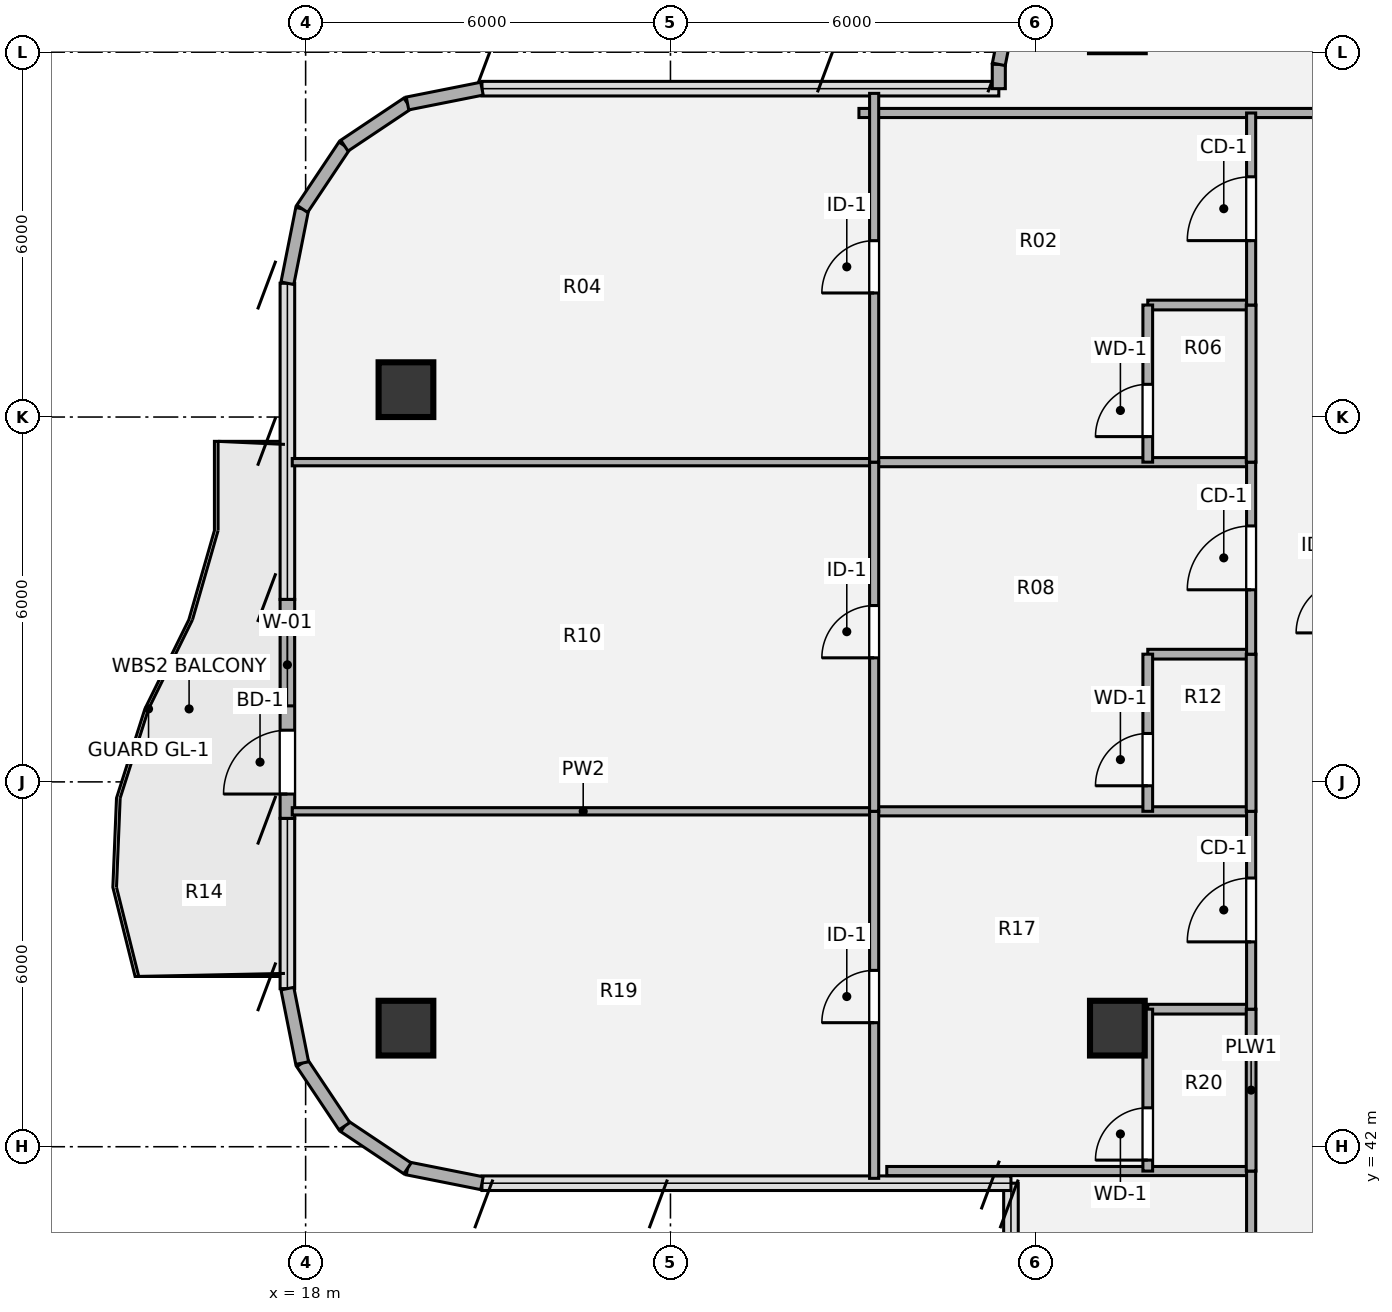
"""IFC4 building model, lengths in metres.
Left out: names, types, materials, properties, quantities, classifications, styles, units other than length and angle.
Written with IfcOpenShell. Run it as: python <this file> out.ifc"""

import sys

from ifc_helpers import new_model, si_unit, direction, frame, frame_2d, origin, origin_2d, place, context, subcontext, project, spatial, rectangle, hollow_circle, extrude, source, transform, mapped, element, fill, save


model = new_model("IFC4")
c1 = context("Model", 3, precision=1e-05, world=origin(), true_north=direction((0.0, 1.0)))
c2 = subcontext(c1, "Body", "Model", "MODEL_VIEW")
j1 = project(units=[si_unit("LENGTHUNIT", "METRE"), si_unit("PLANEANGLEUNIT", "RADIAN")], contexts=[c1])
p1 = place(None, origin())
s1 = spatial("IfcSite", under=j1, at=p1, CompositionType="ELEMENT")
p2 = place(p1, origin())
s2 = spatial("IfcBuilding", under=s1, at=p2, CompositionType="ELEMENT")
p3 = place(p2, frame((0.0, 0.0, 238.14)))
s3 = spatial("IfcBuildingStorey", under=s2, at=p3, CompositionType="ELEMENT", Elevation=238.14)
m1 = source(origin(), c2, "Body", "SweptSolid", [
    extrude(hollow_circle(Radius=0.45, WallThickness=0.032, at=origin_2d()), origin(), (0.0, 0.0, 1.0), 3.78),
])
for number, where, z_axis, x_axis in (
    (1, (19.65, 43.95, 0.0), (0.0, 0.0, 1.0), (1.0, 0.0, 0.0)),
    (2, (19.65, 54.45, 0.0), (0.0, 0.0, 1.0), (1.0, 0.0, 0.0)),
    (3, (31.35, 43.95, 0.0), (0.0, 0.0, 1.0), (1.0, 0.0, 0.0)),
):
    element("IfcColumn", number, at=place(p3, frame(where, z_axis=z_axis, x_axis=x_axis)), inside=s3, PredefinedType="COLUMN", context=c2, shape_type="MappedRepresentation", body=[
        mapped(m1, transform((0.0, 0.0, 0.0), x_axis=(1.0, 0.0, 0.0), y_axis=(0.0, 1.0, 0.0), z_axis=(0.0, 0.0, 1.0), scale=1.0)),
    ])
for number, where, z_axis, x_axis in (
    (4, (20.9, 41.4, 0.0), (0.0, 0.0, 1.0), (-0.981, 0.195, 0.0)),
    (5, (19.675, 41.644, 0.0), (0.0, 0.0, 1.0), (-0.831, 0.556, 0.0)),
    (6, (18.637, 42.337, 0.0), (0.0, 0.0, 1.0), (-0.556, 0.831, 0.0)),
    (7, (17.944, 43.375, 0.0), (0.0, 0.0, 1.0), (-0.195, 0.981, 0.0)),
):
    element("IfcWall", number, at=place(p3, frame(where, z_axis=z_axis, x_axis=x_axis)), inside=s3, PredefinedType="SOLIDWALL", context=c2, shape_type="SweptSolid", body=[
        extrude(rectangle(XDim=1.249, YDim=0.215, at=frame_2d((0.624, 0.0))), origin(), (0.0, 0.0, 1.0), 3.53),
    ])
p4 = place(p3, frame((17.7, 47.4, 0.0), z_axis=(0.0, 0.0, 1.0), x_axis=(0.0, 1.0, 0.0)))
e8 = element("IfcWall", 8, at=p4, inside=s3, PredefinedType="SOLIDWALL", context=c2, shape_type="SweptSolid", body=[
    extrude(rectangle(XDim=3.6, YDim=0.24, at=frame_2d((1.8, 0.0))), origin(), (0.0, 0.0, 1.0), 3.53),
])
p5 = place(p4, frame((0.4, 0.0, 0.0)))
e9 = element("IfcOpeningElement", 9, at=p5, cuts=e8, PredefinedType="OPENING", context=c2, shape_type="SweptSolid", body=[
    extrude(rectangle(XDim=1.05, YDim=2.15, at=origin_2d()), frame((0.525, 0.13, 1.075), z_axis=(0.0, -1.0, 0.0), x_axis=(1.0, 0.0, 0.0)), (0.0, 0.0, 1.0), 0.26),
])
p6 = place(p4, frame((1.85, 0.0, 0.85)))
e10 = element("IfcOpeningElement", 10, at=p6, cuts=e8, PredefinedType="OPENING", context=c2, shape_type="SweptSolid", body=[
    extrude(rectangle(XDim=1.35, YDim=1.35, at=origin_2d()), frame((0.675, 0.13, 0.675), z_axis=(0.0, -1.0, 0.0), x_axis=(1.0, 0.0, 0.0)), (0.0, 0.0, 1.0), 0.26),
])
for number, where, z_axis, x_axis in (
    (11, (17.7, 56.2, 0.0), (0.0, 0.0, 1.0), (0.195, 0.981, 0.0)),
    (12, (17.944, 57.425, 0.0), (0.0, 0.0, 1.0), (0.556, 0.831, 0.0)),
    (13, (18.637, 58.463, 0.0), (0.0, 0.0, 1.0), (0.831, 0.556, 0.0)),
    (14, (19.675, 59.156, 0.0), (0.0, 0.0, 1.0), (0.981, 0.195, 0.0)),
):
    element("IfcWall", number, at=place(p3, frame(where, z_axis=z_axis, x_axis=x_axis)), inside=s3, PredefinedType="SOLIDWALL", context=c2, shape_type="SweptSolid", body=[
        extrude(rectangle(XDim=1.249, YDim=0.215, at=frame_2d((0.624, 0.0))), origin(), (0.0, 0.0, 1.0), 3.53),
    ])
p7 = place(p3, frame((29.4, 59.4, 0.0), z_axis=(0.0, 0.0, 1.0), x_axis=(0.0, 1.0, 0.0)))
e15 = element("IfcWall", 15, at=p7, inside=s3, PredefinedType="SOLIDWALL", context=c2, shape_type="SweptSolid", body=[
    extrude(rectangle(XDim=0.4, YDim=0.215, at=frame_2d((0.2, 0.0))), origin(), (0.0, 0.0, 1.0), 3.53),
])
p8 = place(p3, frame((29.4, 59.8, 0.0), z_axis=(0.0, 0.0, 1.0), x_axis=(0.195190360752, 0.980765376158, 0.0)))
e16 = element("IfcWall", 16, at=p8, inside=s3, PredefinedType="SOLIDWALL", context=c2, shape_type="SweptSolid", body=[
    extrude(rectangle(XDim=1.014, YDim=0.215, at=frame_2d((0.507, 0.0))), origin(), (0.0, 0.0, 1.0), 3.53),
])
p9 = place(p3, frame((27.558, 41.6, 0.0), z_axis=(0.0, 0.0, 1.0), x_axis=(1.0, 0.0, 0.0)))
e17 = element("IfcWall", 17, at=p9, inside=s3, PredefinedType="PARTITIONING", context=c2, shape_type="SweptSolid", body=[
    extrude(rectangle(XDim=5.992, YDim=0.15, at=frame_2d((2.996, 0.0))), origin(), (0.0, 0.0, 1.0), 3.5),
])
p10 = place(p3, frame((31.85, 44.262, 0.0), z_axis=(0.0, 0.0, 1.0), x_axis=(1.0, 0.0, 0.0)))
e18 = element("IfcWall", 18, at=p10, inside=s3, PredefinedType="PLUMBINGWALL", context=c2, shape_type="SweptSolid", body=[
    extrude(rectangle(XDim=1.7, YDim=0.16, at=frame_2d((0.85, 0.0))), origin(), (0.0, 0.0, 1.0), 2.903),
])
p11 = place(p3, frame((17.78, 47.516, 0.0), z_axis=(0.0, 0.0, 1.0), x_axis=(1.0, 0.0, 0.0)))
e19 = element("IfcWall", 19, at=p11, inside=s3, PredefinedType="PARTITIONING", context=c2, shape_type="SweptSolid", body=[
    extrude(rectangle(XDim=9.57, YDim=0.12, at=frame_2d((4.785, 0.0))), origin(), (0.0, 0.0, 1.0), 2.982),
])
p12 = place(p3, frame((27.35, 47.516, 0.0), z_axis=(0.0, 0.0, 1.0), x_axis=(1.0, 0.0, 0.0)))
e20 = element("IfcWall", 20, at=p12, inside=s3, PredefinedType="PARTITIONING", context=c2, shape_type="SweptSolid", body=[
    extrude(rectangle(XDim=6.2, YDim=0.15, at=frame_2d((3.1, 0.0))), origin(), (0.0, 0.0, 1.0), 2.982),
])
p13 = place(p3, frame((31.85, 50.1, 0.0), z_axis=(0.0, 0.0, 1.0), x_axis=(1.0, 0.0, 0.0)))
e21 = element("IfcWall", 21, at=p13, inside=s3, PredefinedType="PLUMBINGWALL", context=c2, shape_type="SweptSolid", body=[
    extrude(rectangle(XDim=1.7, YDim=0.16, at=frame_2d((0.85, 0.0))), origin(), (0.0, 0.0, 1.0), 3.259),
])
p14 = place(p3, frame((17.78, 53.258, 0.0), z_axis=(0.0, 0.0, 1.0), x_axis=(1.0, 0.0, 0.0)))
e22 = element("IfcWall", 22, at=p14, inside=s3, PredefinedType="PARTITIONING", context=c2, shape_type="SweptSolid", body=[
    extrude(rectangle(XDim=9.57, YDim=0.12, at=frame_2d((4.785, 0.0))), origin(), (0.0, 0.0, 1.0), 3.055),
])
p15 = place(p3, frame((27.35, 53.258, 0.0), z_axis=(0.0, 0.0, 1.0), x_axis=(1.0, 0.0, 0.0)))
e23 = element("IfcWall", 23, at=p15, inside=s3, PredefinedType="PARTITIONING", context=c2, shape_type="SweptSolid", body=[
    extrude(rectangle(XDim=6.2, YDim=0.15, at=frame_2d((3.1, 0.0))), origin(), (0.0, 0.0, 1.0), 3.055),
])
p16 = place(p3, frame((31.85, 55.842, 0.0), z_axis=(0.0, 0.0, 1.0), x_axis=(1.0, 0.0, 0.0)))
e24 = element("IfcWall", 24, at=p16, inside=s3, PredefinedType="PLUMBINGWALL", context=c2, shape_type="SweptSolid", body=[
    extrude(rectangle(XDim=1.7, YDim=0.16, at=frame_2d((0.85, 0.0))), origin(), (0.0, 0.0, 1.0), 3.259),
])
p17 = place(p3, frame((27.1, 59.0, 0.0), z_axis=(0.0, 0.0, 1.0), x_axis=(1.0, 0.0, 0.0)))
e25 = element("IfcWall", 25, at=p17, inside=s3, PredefinedType="PARTITIONING", context=c2, shape_type="SweptSolid", body=[
    extrude(rectangle(XDim=17.8, YDim=0.15, at=frame_2d((8.9, 0.0))), origin(), (0.0, 0.0, 1.0), 3.308),
])
p18 = place(p17, frame((8.375, 0.0, 0.0)))
e26 = element("IfcOpeningElement", 26, at=p18, cuts=e25, PredefinedType="OPENING", context=c2, shape_type="SweptSolid", body=[
    extrude(rectangle(XDim=1.05, YDim=2.1, at=origin_2d()), frame((0.525, 0.085, 1.05), z_axis=(0.0, -1.0, 0.0), x_axis=(1.0, 0.0, 0.0)), (0.0, 0.0, 1.0), 0.17),
])
p19 = place(p3, frame((27.35, 41.48, 0.0), z_axis=(0.0, 0.0, 1.0), x_axis=(0.0, 1.0, 0.0)))
e27 = element("IfcWall", 27, at=p19, inside=s3, PredefinedType="PARTITIONING", context=c2, shape_type="SweptSolid", body=[
    extrude(rectangle(XDim=6.036, YDim=0.15, at=frame_2d((3.018, 0.0))), origin(), (0.0, 0.0, 1.0), 3.5),
])
p20 = place(p19, frame((2.56, 0.0, 0.0)))
e28 = element("IfcOpeningElement", 28, at=p20, cuts=e27, PredefinedType="OPENING", context=c2, shape_type="SweptSolid", body=[
    extrude(rectangle(XDim=0.86, YDim=2.1, at=origin_2d()), frame((0.43, 0.085, 1.05), z_axis=(0.0, -1.0, 0.0), x_axis=(1.0, 0.0, 0.0)), (0.0, 0.0, 1.0), 0.17),
])
p21 = place(p3, frame((27.35, 47.516, 0.0), z_axis=(0.0, 0.0, 1.0), x_axis=(0.0, 1.0, 0.0)))
e29 = element("IfcWall", 29, at=p21, inside=s3, PredefinedType="PARTITIONING", context=c2, shape_type="SweptSolid", body=[
    extrude(rectangle(XDim=5.742, YDim=0.15, at=frame_2d((2.871, 0.0))), origin(), (0.0, 0.0, 1.0), 3.5),
])
p22 = place(p21, frame((2.524, 0.0, 0.0)))
e30 = element("IfcOpeningElement", 30, at=p22, cuts=e29, PredefinedType="OPENING", context=c2, shape_type="SweptSolid", body=[
    extrude(rectangle(XDim=0.86, YDim=2.1, at=origin_2d()), frame((0.43, 0.085, 1.05), z_axis=(0.0, -1.0, 0.0), x_axis=(1.0, 0.0, 0.0)), (0.0, 0.0, 1.0), 0.17),
])
p23 = place(p3, frame((27.35, 53.258, 0.0), z_axis=(0.0, 0.0, 1.0), x_axis=(0.0, 1.0, 0.0)))
e31 = element("IfcWall", 31, at=p23, inside=s3, PredefinedType="PARTITIONING", context=c2, shape_type="SweptSolid", body=[
    extrude(rectangle(XDim=6.064, YDim=0.15, at=frame_2d((3.032, 0.0))), origin(), (0.0, 0.0, 1.0), 3.5),
])
p24 = place(p23, frame((2.782, 0.0, 0.0)))
e32 = element("IfcOpeningElement", 32, at=p24, cuts=e31, PredefinedType="OPENING", context=c2, shape_type="SweptSolid", body=[
    extrude(rectangle(XDim=0.86, YDim=2.1, at=origin_2d()), frame((0.43, 0.085, 1.05), z_axis=(0.0, -1.0, 0.0), x_axis=(1.0, 0.0, 0.0)), (0.0, 0.0, 1.0), 0.17),
])
p25 = place(p3, frame((31.85, 41.6, 0.0), z_axis=(0.0, 0.0, 1.0), x_axis=(0.0, 1.0, 0.0)))
e33 = element("IfcWall", 33, at=p25, inside=s3, PredefinedType="PLUMBINGWALL", context=c2, shape_type="SweptSolid", body=[
    extrude(rectangle(XDim=2.662, YDim=0.16, at=frame_2d((1.331, 0.0))), origin(), (0.0, 0.0, 1.0), 3.5),
])
p26 = place(p25, frame((0.18, 0.0, 0.0)))
e34 = element("IfcOpeningElement", 34, at=p26, cuts=e33, PredefinedType="OPENING", context=c2, shape_type="SweptSolid", body=[
    extrude(rectangle(XDim=0.86, YDim=2.1, at=origin_2d()), frame((0.43, 0.09, 1.05), z_axis=(0.0, -1.0, 0.0), x_axis=(1.0, 0.0, 0.0)), (0.0, 0.0, 1.0), 0.18),
])
p27 = place(p3, frame((31.85, 47.516, 0.0), z_axis=(0.0, 0.0, 1.0), x_axis=(0.0, 1.0, 0.0)))
e35 = element("IfcWall", 35, at=p27, inside=s3, PredefinedType="PLUMBINGWALL", context=c2, shape_type="SweptSolid", body=[
    extrude(rectangle(XDim=2.584, YDim=0.16, at=frame_2d((1.292, 0.0))), origin(), (0.0, 0.0, 1.0), 3.5),
])
p28 = place(p27, frame((0.42, 0.0, 0.0)))
e36 = element("IfcOpeningElement", 36, at=p28, cuts=e35, PredefinedType="OPENING", context=c2, shape_type="SweptSolid", body=[
    extrude(rectangle(XDim=0.86, YDim=2.1, at=origin_2d()), frame((0.43, 0.09, 1.05), z_axis=(0.0, -1.0, 0.0), x_axis=(1.0, 0.0, 0.0)), (0.0, 0.0, 1.0), 0.18),
])
p29 = place(p3, frame((31.85, 53.258, 0.0), z_axis=(0.0, 0.0, 1.0), x_axis=(0.0, 1.0, 0.0)))
e37 = element("IfcWall", 37, at=p29, inside=s3, PredefinedType="PLUMBINGWALL", context=c2, shape_type="SweptSolid", body=[
    extrude(rectangle(XDim=2.584, YDim=0.16, at=frame_2d((1.292, 0.0))), origin(), (0.0, 0.0, 1.0), 3.5),
])
p30 = place(p29, frame((0.42, 0.0, 0.0)))
e38 = element("IfcOpeningElement", 38, at=p30, cuts=e37, PredefinedType="OPENING", context=c2, shape_type="SweptSolid", body=[
    extrude(rectangle(XDim=0.86, YDim=2.1, at=origin_2d()), frame((0.43, 0.09, 1.05), z_axis=(0.0, -1.0, 0.0), x_axis=(1.0, 0.0, 0.0)), (0.0, 0.0, 1.0), 0.18),
])
p31 = place(p3, frame((33.55, 22.8, 0.0), z_axis=(0.0, 0.0, 1.0), x_axis=(0.0, 1.0, 0.0)))
e39 = element("IfcWall", 39, at=p31, inside=s3, PredefinedType="PARTITIONING", context=c2, shape_type="SweptSolid", body=[
    extrude(rectangle(XDim=18.8, YDim=0.15, at=frame_2d((9.4, 0.0))), origin(), (0.0, 0.0, 1.0), 3.5),
])
p32 = place(p31, frame((8.84, 0.0, 0.0)))
e40 = element("IfcOpeningElement", 40, at=p32, cuts=e39, PredefinedType="OPENING", context=c2, shape_type="SweptSolid", body=[
    extrude(rectangle(XDim=0.86, YDim=2.1, at=origin_2d()), frame((0.43, 0.085, 1.05), z_axis=(0.0, -1.0, 0.0), x_axis=(1.0, 0.0, 0.0)), (0.0, 0.0, 1.0), 0.17),
])
p33 = place(p3, frame((33.55, 41.6, 0.0), z_axis=(0.0, 0.0, 1.0), x_axis=(0.0, 1.0, 0.0)))
e41 = element("IfcWall", 41, at=p33, inside=s3, PredefinedType="PLUMBINGWALL", context=c2, shape_type="SweptSolid", body=[
    extrude(rectangle(XDim=2.662, YDim=0.16, at=frame_2d((1.331, 0.0))), origin(), (0.0, 0.0, 1.0), 3.5),
])
p34 = place(p3, frame((33.55, 44.262, 0.0), z_axis=(0.0, 0.0, 1.0), x_axis=(0.0, 1.0, 0.0)))
e42 = element("IfcWall", 42, at=p34, inside=s3, PredefinedType="PARTITIONING", context=c2, shape_type="SweptSolid", body=[
    extrude(rectangle(XDim=3.254, YDim=0.15, at=frame_2d((1.627, 0.0))), origin(), (0.0, 0.0, 1.0), 3.5),
])
p35 = place(p34, frame((1.107, 0.0, 0.0)))
e43 = element("IfcOpeningElement", 43, at=p35, cuts=e42, PredefinedType="OPENING", context=c2, shape_type="SweptSolid", body=[
    extrude(rectangle(XDim=1.05, YDim=2.1, at=origin_2d()), frame((0.525, 0.085, 1.05), z_axis=(0.0, -1.0, 0.0), x_axis=(1.0, 0.0, 0.0)), (0.0, 0.0, 1.0), 0.17),
])
p36 = place(p3, frame((33.55, 47.516, 0.0), z_axis=(0.0, 0.0, 1.0), x_axis=(0.0, 1.0, 0.0)))
e44 = element("IfcWall", 44, at=p36, inside=s3, PredefinedType="PLUMBINGWALL", context=c2, shape_type="SweptSolid", body=[
    extrude(rectangle(XDim=2.584, YDim=0.16, at=frame_2d((1.292, 0.0))), origin(), (0.0, 0.0, 1.0), 3.5),
])
p37 = place(p3, frame((33.55, 50.1, 0.0), z_axis=(0.0, 0.0, 1.0), x_axis=(0.0, 1.0, 0.0)))
e45 = element("IfcWall", 45, at=p37, inside=s3, PredefinedType="PARTITIONING", context=c2, shape_type="SweptSolid", body=[
    extrude(rectangle(XDim=3.158, YDim=0.15, at=frame_2d((1.579, 0.0))), origin(), (0.0, 0.0, 1.0), 3.5),
])
p38 = place(p37, frame((1.059, 0.0, 0.0)))
e46 = element("IfcOpeningElement", 46, at=p38, cuts=e45, PredefinedType="OPENING", context=c2, shape_type="SweptSolid", body=[
    extrude(rectangle(XDim=1.05, YDim=2.1, at=origin_2d()), frame((0.525, 0.085, 1.05), z_axis=(0.0, -1.0, 0.0), x_axis=(1.0, 0.0, 0.0)), (0.0, 0.0, 1.0), 0.17),
])
p39 = place(p3, frame((33.55, 53.258, 0.0), z_axis=(0.0, 0.0, 1.0), x_axis=(0.0, 1.0, 0.0)))
e47 = element("IfcWall", 47, at=p39, inside=s3, PredefinedType="PLUMBINGWALL", context=c2, shape_type="SweptSolid", body=[
    extrude(rectangle(XDim=2.584, YDim=0.16, at=frame_2d((1.292, 0.0))), origin(), (0.0, 0.0, 1.0), 3.5),
])
p40 = place(p3, frame((33.55, 55.842, 0.0), z_axis=(0.0, 0.0, 1.0), x_axis=(0.0, 1.0, 0.0)))
e48 = element("IfcWall", 48, at=p40, inside=s3, PredefinedType="PARTITIONING", context=c2, shape_type="SweptSolid", body=[
    extrude(rectangle(XDim=3.158, YDim=0.15, at=frame_2d((1.579, 0.0))), origin(), (0.0, 0.0, 1.0), 3.5),
])
p41 = place(p40, frame((1.059, 0.0, 0.0)))
e49 = element("IfcOpeningElement", 49, at=p41, cuts=e48, PredefinedType="OPENING", context=c2, shape_type="SweptSolid", body=[
    extrude(rectangle(XDim=1.05, YDim=2.1, at=origin_2d()), frame((0.525, 0.085, 1.05), z_axis=(0.0, -1.0, 0.0), x_axis=(1.0, 0.0, 0.0)), (0.0, 0.0, 1.0), 0.17),
])
m2 = source(origin(), c2, "Body", "SweptSolid", [
    extrude(rectangle(XDim=1.05, YDim=2.15, at=origin_2d()), frame((0.525, 0.025, 1.075), z_axis=(0.0, -1.0, 0.0), x_axis=(1.0, 0.0, 0.0)), (0.0, 0.0, 1.0), 0.05),
])
p42 = place(p5, origin())
e50 = element("IfcDoor", 50, at=p42, inside=s3, OperationType="SINGLE_SWING_LEFT", PredefinedType="DOOR", context=c2, shape_type="MappedRepresentation", body=[
    mapped(m2, transform((0.0, 0.0, 0.0), x_axis=(1.0, 0.0, 0.0), y_axis=(0.0, 1.0, 0.0), z_axis=(0.0, 0.0, 1.0), scale=1.0)),
])
fill(e9, e50)
m3 = source(origin(), c2, "Body", "SweptSolid", [
    extrude(rectangle(XDim=1.35, YDim=1.35, at=origin_2d()), frame((0.675, 0.03, 0.675), z_axis=(0.0, -1.0, 0.0), x_axis=(1.0, 0.0, 0.0)), (0.0, 0.0, 1.0), 0.06),
])
p43 = place(p6, origin())
e51 = element("IfcWindow", 51, at=p43, inside=s3, PartitioningType="SINGLE_PANEL", PredefinedType="WINDOW", context=c2, shape_type="MappedRepresentation", body=[
    mapped(m3, transform((0.0, 0.0, 0.0), x_axis=(1.0, 0.0, 0.0), y_axis=(0.0, 1.0, 0.0), z_axis=(0.0, 0.0, 1.0), scale=1.0)),
])
fill(e10, e51)
m4 = source(origin(), c2, "Body", "SweptSolid", [
    extrude(rectangle(XDim=0.86, YDim=2.1, at=origin_2d()), frame((0.43, 0.025, 1.05), z_axis=(0.0, -1.0, 0.0), x_axis=(1.0, 0.0, 0.0)), (0.0, 0.0, 1.0), 0.05),
])
p44 = place(p20, origin())
e52 = element("IfcDoor", 52, at=p44, inside=s3, OperationType="SINGLE_SWING_LEFT", PredefinedType="DOOR", context=c2, shape_type="MappedRepresentation", body=[
    mapped(m4, transform((0.0, 0.0, 0.0), x_axis=(1.0, 0.0, 0.0), y_axis=(0.0, 1.0, 0.0), z_axis=(0.0, 0.0, 1.0), scale=1.0)),
])
fill(e28, e52)
p45 = place(p22, origin())
e53 = element("IfcDoor", 53, at=p45, inside=s3, OperationType="SINGLE_SWING_LEFT", PredefinedType="DOOR", context=c2, shape_type="MappedRepresentation", body=[
    mapped(m4, transform((0.0, 0.0, 0.0), x_axis=(1.0, 0.0, 0.0), y_axis=(0.0, 1.0, 0.0), z_axis=(0.0, 0.0, 1.0), scale=1.0)),
])
fill(e30, e53)
p46 = place(p24, origin())
e54 = element("IfcDoor", 54, at=p46, inside=s3, OperationType="SINGLE_SWING_LEFT", PredefinedType="DOOR", context=c2, shape_type="MappedRepresentation", body=[
    mapped(m4, transform((0.0, 0.0, 0.0), x_axis=(1.0, 0.0, 0.0), y_axis=(0.0, 1.0, 0.0), z_axis=(0.0, 0.0, 1.0), scale=1.0)),
])
fill(e32, e54)
m5 = source(origin(), c2, "Body", "SweptSolid", [
    extrude(rectangle(XDim=0.86, YDim=2.1, at=origin_2d()), frame((0.43, 0.025, 1.05), z_axis=(0.0, -1.0, 0.0), x_axis=(1.0, 0.0, 0.0)), (0.0, 0.0, 1.0), 0.05),
])
p47 = place(p26, origin())
e55 = element("IfcDoor", 55, at=p47, inside=s3, OperationType="SINGLE_SWING_LEFT", PredefinedType="DOOR", context=c2, shape_type="MappedRepresentation", body=[
    mapped(m5, transform((0.0, 0.0, 0.0), x_axis=(1.0, 0.0, 0.0), y_axis=(0.0, 1.0, 0.0), z_axis=(0.0, 0.0, 1.0), scale=1.0)),
])
fill(e34, e55)
p48 = place(p28, origin())
e56 = element("IfcDoor", 56, at=p48, inside=s3, OperationType="SINGLE_SWING_LEFT", PredefinedType="DOOR", context=c2, shape_type="MappedRepresentation", body=[
    mapped(m5, transform((0.0, 0.0, 0.0), x_axis=(1.0, 0.0, 0.0), y_axis=(0.0, 1.0, 0.0), z_axis=(0.0, 0.0, 1.0), scale=1.0)),
])
fill(e36, e56)
p49 = place(p30, origin())
e57 = element("IfcDoor", 57, at=p49, inside=s3, OperationType="SINGLE_SWING_LEFT", PredefinedType="DOOR", context=c2, shape_type="MappedRepresentation", body=[
    mapped(m5, transform((0.0, 0.0, 0.0), x_axis=(1.0, 0.0, 0.0), y_axis=(0.0, 1.0, 0.0), z_axis=(0.0, 0.0, 1.0), scale=1.0)),
])
fill(e38, e57)
m6 = source(origin(), c2, "Body", "SweptSolid", [
    extrude(rectangle(XDim=1.05, YDim=2.1, at=origin_2d()), frame((0.525, 0.025, 1.05), z_axis=(0.0, -1.0, 0.0), x_axis=(1.0, 0.0, 0.0)), (0.0, 0.0, 1.0), 0.05),
])
p50 = place(p35, origin())
e58 = element("IfcDoor", 58, at=p50, inside=s3, OperationType="SINGLE_SWING_LEFT", PredefinedType="DOOR", context=c2, shape_type="MappedRepresentation", body=[
    mapped(m6, transform((0.0, 0.0, 0.0), x_axis=(1.0, 0.0, 0.0), y_axis=(0.0, 1.0, 0.0), z_axis=(0.0, 0.0, 1.0), scale=1.0)),
])
fill(e43, e58)
p51 = place(p38, origin())
e59 = element("IfcDoor", 59, at=p51, inside=s3, OperationType="SINGLE_SWING_LEFT", PredefinedType="DOOR", context=c2, shape_type="MappedRepresentation", body=[
    mapped(m6, transform((0.0, 0.0, 0.0), x_axis=(1.0, 0.0, 0.0), y_axis=(0.0, 1.0, 0.0), z_axis=(0.0, 0.0, 1.0), scale=1.0)),
])
fill(e46, e59)
p52 = place(p41, origin())
e60 = element("IfcDoor", 60, at=p52, inside=s3, OperationType="SINGLE_SWING_LEFT", PredefinedType="DOOR", context=c2, shape_type="MappedRepresentation", body=[
    mapped(m6, transform((0.0, 0.0, 0.0), x_axis=(1.0, 0.0, 0.0), y_axis=(0.0, 1.0, 0.0), z_axis=(0.0, 0.0, 1.0), scale=1.0)),
])
fill(e49, e60)
save(model, sys.argv[1])
